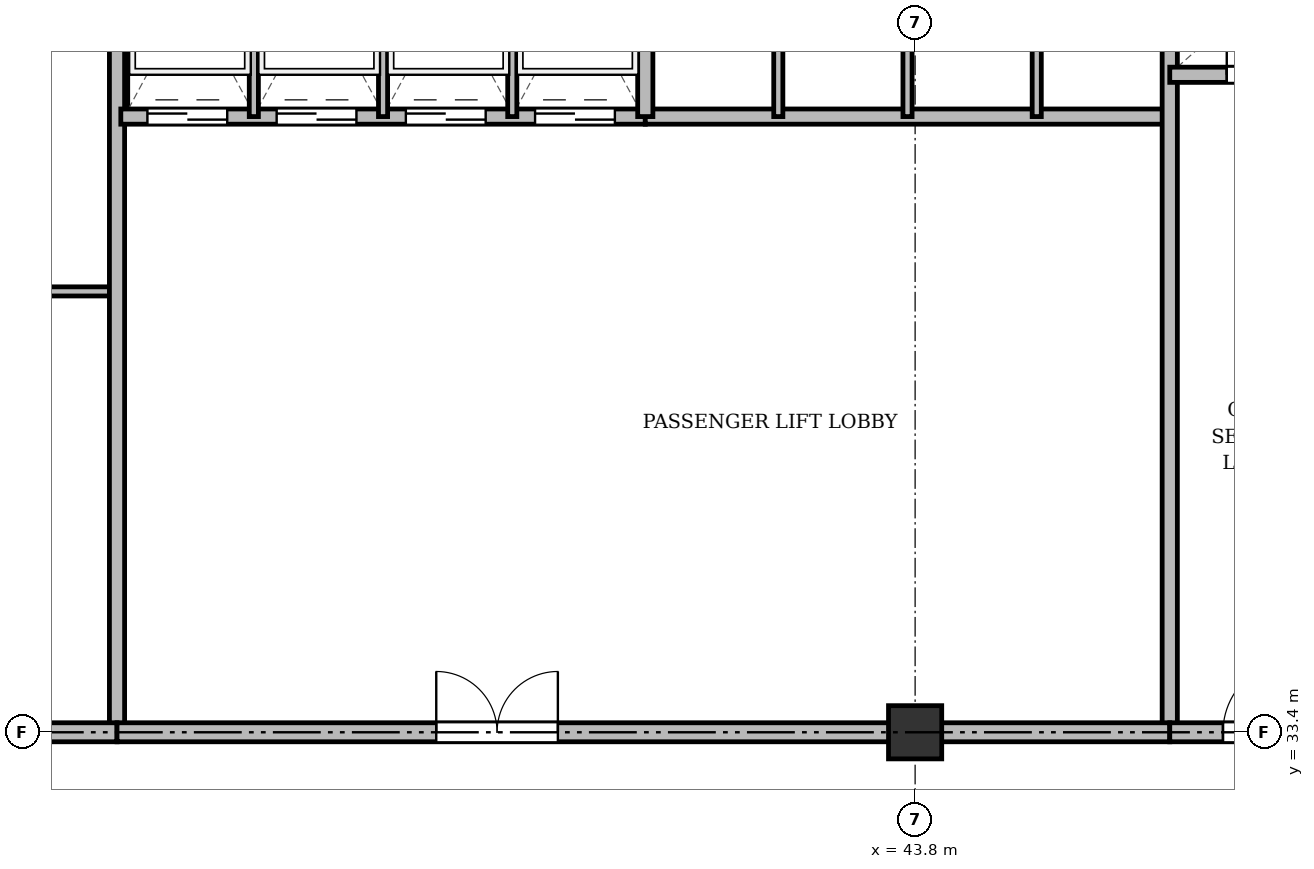
"""IFC4 building model, lengths in metres.
Left out: names, types, materials, properties, quantities, classifications, styles, units other than length and angle.
Written with IfcOpenShell. Run it as: python <this file> out.ifc"""

import sys

from ifc_helpers import new_model, si_unit, direction, frame, frame_2d, origin, origin_2d, place, context, subcontext, project, spatial, rectangle, extrude, source, transform, mapped, element, fill, save


model = new_model("IFC4")
c1 = context("Model", 3, precision=1e-05, world=origin(), true_north=direction((0.0, 1.0)))
c2 = subcontext(c1, "Body", "Model", "MODEL_VIEW")
j1 = project(units=[si_unit("LENGTHUNIT", "METRE"), si_unit("PLANEANGLEUNIT", "RADIAN")], contexts=[c1])
p1 = place(None, origin())
s1 = spatial("IfcSite", under=j1, at=p1, CompositionType="ELEMENT")
p2 = place(p1, origin())
s2 = spatial("IfcBuilding", under=s1, at=p2, CompositionType="ELEMENT")
p3 = place(p2, frame((0.0, 0.0, 197.7)))
s3 = spatial("IfcBuildingStorey", under=s2, at=p3, CompositionType="ELEMENT", Elevation=197.7)
m1 = source(origin(), c2, "Body", "SweptSolid", [
    extrude(rectangle(XDim=0.7, YDim=0.7, at=origin_2d()), origin(), (0.0, 0.0, 1.0), 3.6),
])
p4 = place(p3, frame((43.8, 33.4, 0.0), z_axis=(0.0, 0.0, 1.0), x_axis=(1.0, 0.0, 0.0)))
e1 = element("IfcColumn", 1, at=p4, inside=s3, PredefinedType="COLUMN", context=c2, shape_type="MappedRepresentation", body=[
    mapped(m1, transform((0.0, 0.0, 0.0), x_axis=(1.0, 0.0, 0.0), y_axis=(0.0, 1.0, 0.0), z_axis=(0.0, 0.0, 1.0), scale=1.0)),
])
p5 = place(p3, frame((26.3, 39.2, 0.0), z_axis=(0.0, 0.0, 1.0), x_axis=(1.0, 0.0, 0.0)))
e2 = element("IfcWall", 2, at=p5, inside=s3, PredefinedType="PARTITIONING", context=c2, shape_type="SweptSolid", body=[
    extrude(rectangle(XDim=7.0, YDim=0.12, at=frame_2d((3.5, 0.0))), origin(), (0.0, 0.0, 1.0), 2.86),
])
p6 = place(p5, frame((2.6, 0.0, 0.0)))
e3 = element("IfcOpeningElement", 3, at=p6, cuts=e2, PredefinedType="OPENING", context=c2, shape_type="SweptSolid", body=[
    extrude(rectangle(XDim=0.95, YDim=2.15, at=frame_2d((0.475, 1.075))), frame((0.0, 0.07, 0.0), z_axis=(0.0, -1.0, 0.0), x_axis=(1.0, 0.0, 0.0)), (0.0, 0.0, 1.0), 0.14),
])
p7 = place(p3, frame((33.3, 33.4, 0.0), z_axis=(0.0, 0.0, 1.0), x_axis=(0.0, 1.0, 0.0)))
e4 = element("IfcWall", 4, at=p7, inside=s3, PredefinedType="SOLIDWALL", context=c2, shape_type="SweptSolid", body=[
    extrude(rectangle(XDim=11.3, YDim=0.2, at=frame_2d((5.65, 0.0))), origin(), (0.0, 0.0, 1.0), 2.91),
])
p8 = place(p3, frame((33.35, 41.5, 0.0), z_axis=(0.0, 0.0, 1.0), x_axis=(1.0, 0.0, 0.0)))
e5 = element("IfcWall", 5, at=p8, inside=s3, PredefinedType="SOLIDWALL", context=c2, shape_type="SweptSolid", body=[
    extrude(rectangle(XDim=6.9, YDim=0.2, at=frame_2d((3.45, 0.0))), origin(), (0.0, 0.0, 1.0), 3.36),
])
p9 = place(p8, frame((0.35, 0.0, 0.0)))
e6 = element("IfcOpeningElement", 6, at=p9, cuts=e5, PredefinedType="OPENING", context=c2, shape_type="SweptSolid", body=[
    extrude(rectangle(XDim=1.05, YDim=2.15, at=frame_2d((0.525, 1.075))), frame((0.0, 0.11, 0.0), z_axis=(0.0, -1.0, 0.0), x_axis=(1.0, 0.0, 0.0)), (0.0, 0.0, 1.0), 0.22),
])
p10 = place(p8, frame((2.05, 0.0, 0.0)))
e7 = element("IfcOpeningElement", 7, at=p10, cuts=e5, PredefinedType="OPENING", context=c2, shape_type="SweptSolid", body=[
    extrude(rectangle(XDim=1.05, YDim=2.15, at=frame_2d((0.525, 1.075))), frame((0.0, 0.11, 0.0), z_axis=(0.0, -1.0, 0.0), x_axis=(1.0, 0.0, 0.0)), (0.0, 0.0, 1.0), 0.22),
])
p11 = place(p8, frame((3.75, 0.0, 0.0)))
e8 = element("IfcOpeningElement", 8, at=p11, cuts=e5, PredefinedType="OPENING", context=c2, shape_type="SweptSolid", body=[
    extrude(rectangle(XDim=1.05, YDim=2.15, at=frame_2d((0.525, 1.075))), frame((0.0, 0.11, 0.0), z_axis=(0.0, -1.0, 0.0), x_axis=(1.0, 0.0, 0.0)), (0.0, 0.0, 1.0), 0.22),
])
p12 = place(p8, frame((5.45, 0.0, 0.0)))
e9 = element("IfcOpeningElement", 9, at=p12, cuts=e5, PredefinedType="OPENING", context=c2, shape_type="SweptSolid", body=[
    extrude(rectangle(XDim=1.05, YDim=2.15, at=frame_2d((0.525, 1.075))), frame((0.0, 0.11, 0.0), z_axis=(0.0, -1.0, 0.0), x_axis=(1.0, 0.0, 0.0)), (0.0, 0.0, 1.0), 0.22),
])
for number, where, z_axis, x_axis in (
    (10, (35.1, 41.5, 0.0), (0.0, 0.0, 1.0), (0.0, 1.0, 0.0)),
    (11, (36.8, 41.5, 0.0), (0.0, 0.0, 1.0), (0.0, 1.0, 0.0)),
    (12, (38.5, 41.5, 0.0), (0.0, 0.0, 1.0), (0.0, 1.0, 0.0)),
):
    element("IfcWall", number, at=place(p3, frame(where, z_axis=z_axis, x_axis=x_axis)), inside=s3, PredefinedType="PARTITIONING", context=c2, shape_type="SweptSolid", body=[
        extrude(rectangle(XDim=3.2, YDim=0.12, at=frame_2d((1.6, 0.0))), origin(), (0.0, 0.0, 1.0), 3.36),
    ])
p13 = place(p3, frame((40.25, 41.5, 0.0), z_axis=(0.0, 0.0, 1.0), x_axis=(1.0, 0.0, 0.0)))
e13 = element("IfcWall", 13, at=p13, inside=s3, PredefinedType="SOLIDWALL", context=c2, shape_type="SweptSolid", body=[
    extrude(rectangle(XDim=6.9, YDim=0.2, at=frame_2d((3.45, 0.0))), origin(), (0.0, 0.0, 1.0), 2.86),
])
p14 = place(p3, frame((40.25, 41.5, 0.0), z_axis=(0.0, 0.0, 1.0), x_axis=(0.0, 1.0, 0.0)))
e14 = element("IfcWall", 14, at=p14, inside=s3, PredefinedType="SOLIDWALL", context=c2, shape_type="SweptSolid", body=[
    extrude(rectangle(XDim=3.2, YDim=0.2, at=frame_2d((1.6, 0.0))), origin(), (0.0, 0.0, 1.0), 3.36),
])
p15 = place(p3, frame((42.0, 41.5, 0.0), z_axis=(0.0, 0.0, 1.0), x_axis=(0.0, 1.0, 0.0)))
e15 = element("IfcWall", 15, at=p15, inside=s3, PredefinedType="PARTITIONING", context=c2, shape_type="SweptSolid", body=[
    extrude(rectangle(XDim=3.2, YDim=0.12, at=frame_2d((1.6, 0.0))), origin(), (0.0, 0.0, 1.0), 3.36),
])
p16 = place(p3, frame((43.7, 41.5, 0.0), z_axis=(0.0, 0.0, 1.0), x_axis=(0.0, 1.0, 0.0)))
e16 = element("IfcWall", 16, at=p16, inside=s3, PredefinedType="PARTITIONING", context=c2, shape_type="SweptSolid", body=[
    extrude(rectangle(XDim=3.2, YDim=0.12, at=frame_2d((1.6, 0.0))), origin(), (0.0, 0.0, 1.0), 2.86),
])
p17 = place(p3, frame((45.4, 41.5, 0.0), z_axis=(0.0, 0.0, 1.0), x_axis=(0.0, 1.0, 0.0)))
e17 = element("IfcWall", 17, at=p17, inside=s3, PredefinedType="PARTITIONING", context=c2, shape_type="SweptSolid", body=[
    extrude(rectangle(XDim=3.2, YDim=0.12, at=frame_2d((1.6, 0.0))), origin(), (0.0, 0.0, 1.0), 3.36),
])
p18 = place(p3, frame((47.15, 33.4, 0.0), z_axis=(0.0, 0.0, 1.0), x_axis=(0.0, 1.0, 0.0)))
e18 = element("IfcWall", 18, at=p18, inside=s3, PredefinedType="SOLIDWALL", context=c2, shape_type="SweptSolid", body=[
    extrude(rectangle(XDim=11.3, YDim=0.2, at=frame_2d((5.65, 0.0))), origin(), (0.0, 0.0, 1.0), 2.91),
])
p19 = place(p3, frame((26.3, 33.4, 0.0), z_axis=(0.0, 0.0, 1.0), x_axis=(1.0, 0.0, 0.0)))
e19 = element("IfcWall", 19, at=p19, inside=s3, PredefinedType="PARTITIONING", context=c2, shape_type="SweptSolid", body=[
    extrude(rectangle(XDim=7.0, YDim=0.25, at=frame_2d((3.5, 0.0))), origin(), (0.0, 0.0, 1.0), 2.91),
])
p20 = place(p19, frame((1.35, 0.0, 0.0)))
e20 = element("IfcOpeningElement", 20, at=p20, cuts=e19, PredefinedType="OPENING", context=c2, shape_type="SweptSolid", body=[
    extrude(rectangle(XDim=0.95, YDim=2.15, at=frame_2d((0.475, 1.075))), frame((0.0, 0.135, 0.0), z_axis=(0.0, -1.0, 0.0), x_axis=(1.0, 0.0, 0.0)), (0.0, 0.0, 1.0), 0.27),
])
p21 = place(p3, frame((33.3, 33.4, 0.0), z_axis=(0.0, 0.0, 1.0), x_axis=(1.0, 0.0, 0.0)))
e21 = element("IfcWall", 21, at=p21, inside=s3, PredefinedType="PARTITIONING", context=c2, shape_type="SweptSolid", body=[
    extrude(rectangle(XDim=13.85, YDim=0.25, at=frame_2d((6.925, 0.0))), origin(), (0.0, 0.0, 1.0), 2.91),
])
p22 = place(p21, frame((4.2, 0.0, 0.0)))
e22 = element("IfcOpeningElement", 22, at=p22, cuts=e21, PredefinedType="OPENING", context=c2, shape_type="SweptSolid", body=[
    extrude(rectangle(XDim=1.6, YDim=2.2, at=frame_2d((0.8, 1.1))), frame((0.0, 0.135, 0.0), z_axis=(0.0, -1.0, 0.0), x_axis=(1.0, 0.0, 0.0)), (0.0, 0.0, 1.0), 0.27),
])
p23 = place(p3, frame((47.15, 42.05, 0.0), z_axis=(0.0, 0.0, 1.0), x_axis=(1.0, 0.0, 0.0)))
e23 = element("IfcWall", 23, at=p23, inside=s3, PredefinedType="SOLIDWALL", context=c2, shape_type="SweptSolid", body=[
    extrude(rectangle(XDim=7.85, YDim=0.2, at=frame_2d((3.925, 0.0))), origin(), (0.0, 0.0, 1.0), 2.86),
])
p24 = place(p23, frame((0.75, 0.0, 0.0)))
e24 = element("IfcOpeningElement", 24, at=p24, cuts=e23, PredefinedType="OPENING", context=c2, shape_type="SweptSolid", body=[
    extrude(rectangle(XDim=0.9, YDim=2.1, at=frame_2d((0.45, 1.05))), frame((0.0, 0.11, 0.0), z_axis=(0.0, -1.0, 0.0), x_axis=(1.0, 0.0, 0.0)), (0.0, 0.0, 1.0), 0.22),
])
p25 = place(p23, frame((3.85, 0.0, 0.0)))
e25 = element("IfcOpeningElement", 25, at=p25, cuts=e23, PredefinedType="OPENING", context=c2, shape_type="SweptSolid", body=[
    extrude(rectangle(XDim=0.9, YDim=2.1, at=frame_2d((0.45, 1.05))), frame((0.0, 0.11, 0.0), z_axis=(0.0, -1.0, 0.0), x_axis=(1.0, 0.0, 0.0)), (0.0, 0.0, 1.0), 0.22),
])
p26 = place(p3, frame((47.15, 33.4, 0.0), z_axis=(0.0, 0.0, 1.0), x_axis=(1.0, 0.0, 0.0)))
e26 = element("IfcWall", 26, at=p26, inside=s3, PredefinedType="PARTITIONING", context=c2, shape_type="SweptSolid", body=[
    extrude(rectangle(XDim=11.15, YDim=0.25, at=frame_2d((5.575, 0.0))), origin(), (0.0, 0.0, 1.0), 2.91),
])
p27 = place(p26, frame((0.7, 0.0, 0.0)))
e27 = element("IfcOpeningElement", 27, at=p27, cuts=e26, PredefinedType="OPENING", context=c2, shape_type="SweptSolid", body=[
    extrude(rectangle(XDim=0.95, YDim=2.15, at=frame_2d((0.475, 1.075))), frame((0.0, 0.135, 0.0), z_axis=(0.0, -1.0, 0.0), x_axis=(1.0, 0.0, 0.0)), (0.0, 0.0, 1.0), 0.27),
])
p28 = place(p26, frame((6.0, 0.0, 0.0)))
e28 = element("IfcOpeningElement", 28, at=p28, cuts=e26, PredefinedType="OPENING", context=c2, shape_type="SweptSolid", body=[
    extrude(rectangle(XDim=1.2, YDim=2.15, at=frame_2d((0.6, 1.075))), frame((0.0, 0.135, 0.0), z_axis=(0.0, -1.0, 0.0), x_axis=(1.0, 0.0, 0.0)), (0.0, 0.0, 1.0), 0.27),
])
m2 = source(origin(), c2, "Body", "SweptSolid", [
    extrude(rectangle(XDim=1.05, YDim=2.15, at=frame_2d((0.525, 1.075))), frame((0.0, 0.025, 0.0), z_axis=(0.0, -1.0, 0.0), x_axis=(1.0, 0.0, 0.0)), (0.0, 0.0, 1.0), 0.05),
])
p29 = place(p9, origin())
e29 = element("IfcDoor", 29, at=p29, inside=s3, OperationType="DOUBLE_DOOR_SLIDING", PredefinedType="DOOR", context=c2, shape_type="MappedRepresentation", body=[
    mapped(m2, transform((0.0, 0.0, 0.0), x_axis=(1.0, 0.0, 0.0), y_axis=(0.0, 1.0, 0.0), z_axis=(0.0, 0.0, 1.0), scale=1.0)),
])
fill(e6, e29)
p30 = place(p10, origin())
e30 = element("IfcDoor", 30, at=p30, inside=s3, OperationType="DOUBLE_DOOR_SLIDING", PredefinedType="DOOR", context=c2, shape_type="MappedRepresentation", body=[
    mapped(m2, transform((0.0, 0.0, 0.0), x_axis=(1.0, 0.0, 0.0), y_axis=(0.0, 1.0, 0.0), z_axis=(0.0, 0.0, 1.0), scale=1.0)),
])
fill(e7, e30)
p31 = place(p11, origin())
e31 = element("IfcDoor", 31, at=p31, inside=s3, OperationType="DOUBLE_DOOR_SLIDING", PredefinedType="DOOR", context=c2, shape_type="MappedRepresentation", body=[
    mapped(m2, transform((0.0, 0.0, 0.0), x_axis=(1.0, 0.0, 0.0), y_axis=(0.0, 1.0, 0.0), z_axis=(0.0, 0.0, 1.0), scale=1.0)),
])
fill(e8, e31)
p32 = place(p12, origin())
e32 = element("IfcDoor", 32, at=p32, inside=s3, OperationType="DOUBLE_DOOR_SLIDING", PredefinedType="DOOR", context=c2, shape_type="MappedRepresentation", body=[
    mapped(m2, transform((0.0, 0.0, 0.0), x_axis=(1.0, 0.0, 0.0), y_axis=(0.0, 1.0, 0.0), z_axis=(0.0, 0.0, 1.0), scale=1.0)),
])
fill(e9, e32)
m3 = source(origin(), c2, "Body", "SweptSolid", [
    extrude(rectangle(XDim=1.6, YDim=2.2, at=frame_2d((0.8, 1.1))), frame((0.0, 0.025, 0.0), z_axis=(0.0, -1.0, 0.0), x_axis=(1.0, 0.0, 0.0)), (0.0, 0.0, 1.0), 0.05),
])
p33 = place(p22, origin())
e33 = element("IfcDoor", 33, at=p33, inside=s3, OperationType="DOUBLE_DOOR_SINGLE_SWING", PredefinedType="DOOR", context=c2, shape_type="MappedRepresentation", body=[
    mapped(m3, transform((0.0, 0.0, 0.0), x_axis=(1.0, 0.0, 0.0), y_axis=(0.0, 1.0, 0.0), z_axis=(0.0, 0.0, 1.0), scale=1.0)),
])
fill(e22, e33)
m4 = source(origin(), c2, "Body", "SweptSolid", [
    extrude(rectangle(XDim=0.9, YDim=2.1, at=frame_2d((0.45, 1.05))), frame((0.0, 0.025, 0.0), z_axis=(0.0, -1.0, 0.0), x_axis=(1.0, 0.0, 0.0)), (0.0, 0.0, 1.0), 0.05),
])
p34 = place(p24, origin())
e34 = element("IfcDoor", 34, at=p34, inside=s3, OperationType="SINGLE_SWING_LEFT", PredefinedType="DOOR", context=c2, shape_type="MappedRepresentation", body=[
    mapped(m4, transform((0.0, 0.0, 0.0), x_axis=(1.0, 0.0, 0.0), y_axis=(0.0, 1.0, 0.0), z_axis=(0.0, 0.0, 1.0), scale=1.0)),
])
fill(e24, e34)
m5 = source(origin(), c2, "Body", "SweptSolid", [
    extrude(rectangle(XDim=0.95, YDim=2.15, at=frame_2d((0.475, 1.075))), frame((0.0, 0.025, 0.0), z_axis=(0.0, -1.0, 0.0), x_axis=(1.0, 0.0, 0.0)), (0.0, 0.0, 1.0), 0.05),
])
p35 = place(p27, origin())
e35 = element("IfcDoor", 35, at=p35, inside=s3, OperationType="SINGLE_SWING_RIGHT", PredefinedType="DOOR", context=c2, shape_type="MappedRepresentation", body=[
    mapped(m5, transform((0.0, 0.0, 0.0), x_axis=(1.0, 0.0, 0.0), y_axis=(0.0, 1.0, 0.0), z_axis=(0.0, 0.0, 1.0), scale=1.0)),
])
fill(e27, e35)
save(model, sys.argv[1])
